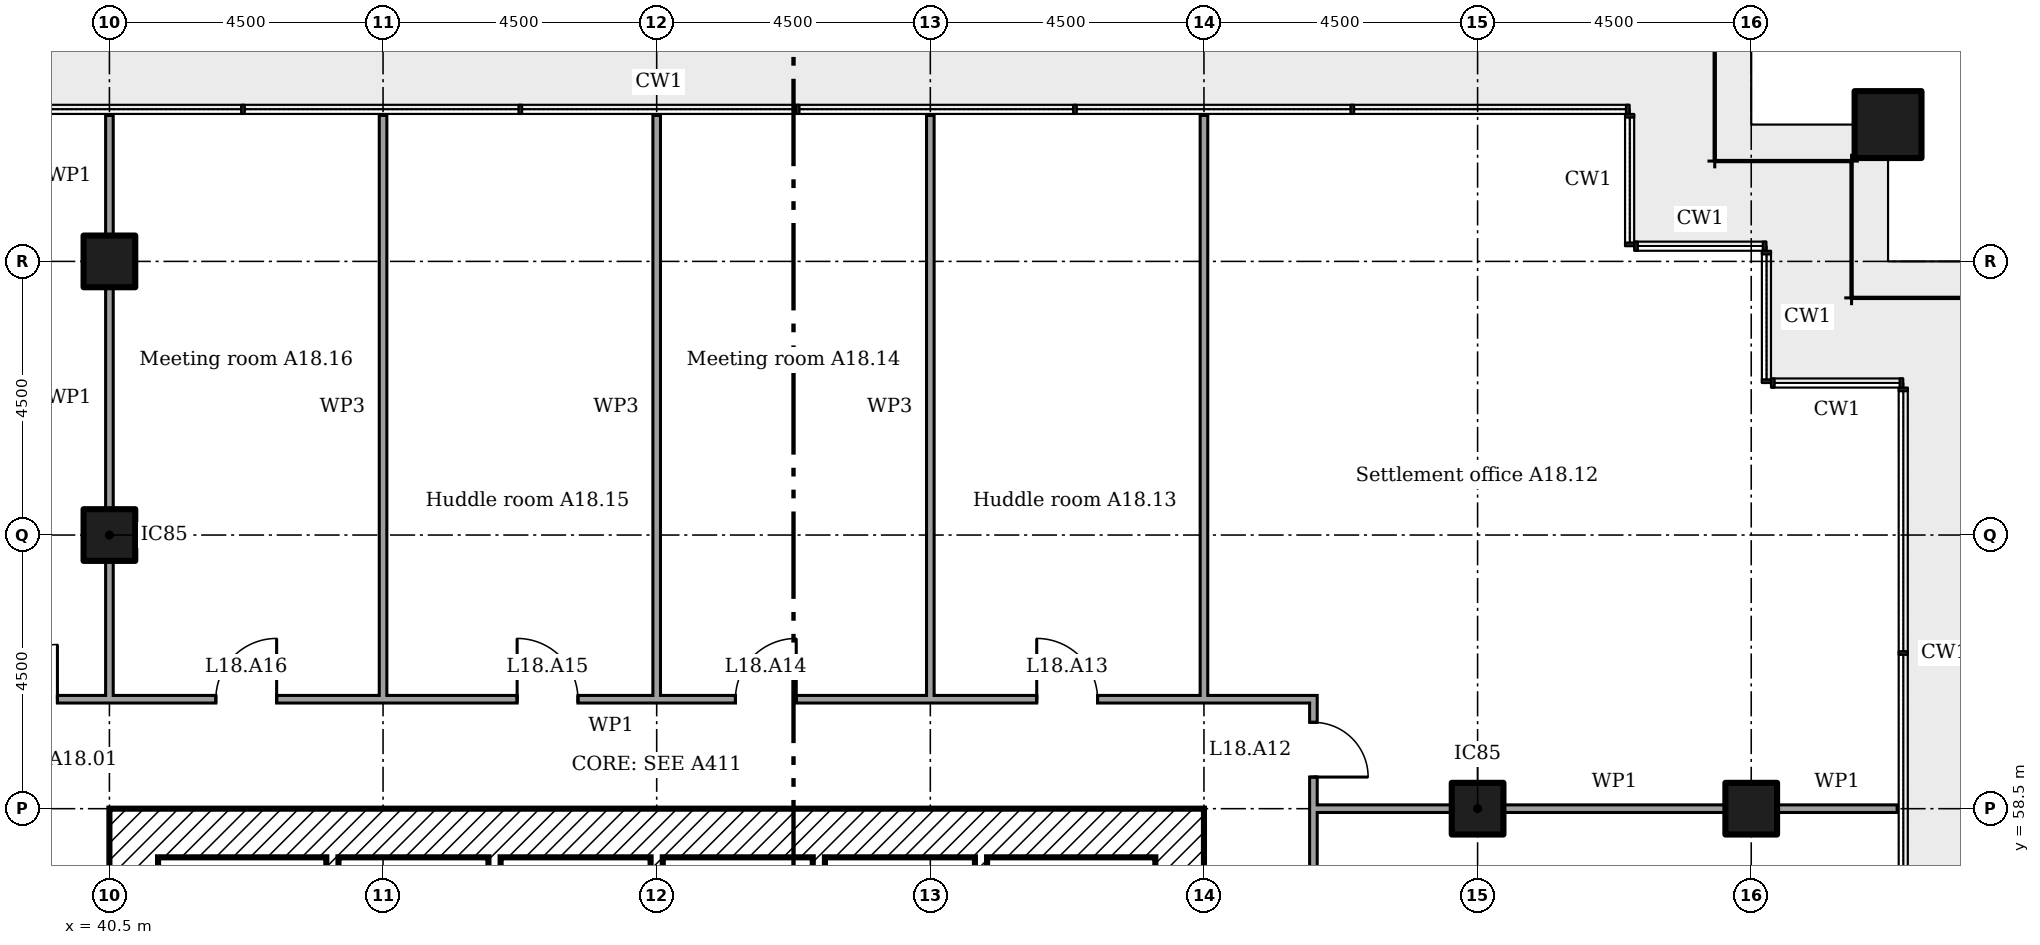
"""IFC4 building model, lengths in metres.
Left out: names, types, materials, properties, quantities, classifications, styles, units other than length and angle.
Written with IfcOpenShell. Run it as: python <this file> out.ifc"""

import sys

from ifc_helpers import new_model, si_unit, direction, frame, frame_2d, origin, origin_2d, place, context, subcontext, project, spatial, rectangle, extrude, element, fill, save


model = new_model("IFC4")
c1 = context("Model", 3, precision=1e-05, world=origin(), true_north=direction((0.0, 1.0)))
c2 = subcontext(c1, "Body", "Model", "MODEL_VIEW")
j1 = project(units=[si_unit("LENGTHUNIT", "METRE"), si_unit("PLANEANGLEUNIT", "RADIAN")], contexts=[c1])
p1 = place(None, origin())
s1 = spatial("IfcSite", under=j1, at=p1, CompositionType="ELEMENT")
p2 = place(p1, origin())
s2 = spatial("IfcBuilding", under=s1, at=p2, CompositionType="ELEMENT")
p3 = place(p2, frame((0.0, 0.0, 76.2)))
s3 = spatial("IfcBuildingStorey", under=s2, at=p3, CompositionType="ELEMENT", Elevation=76.2)
p4 = place(p3, frame((69.75, 69.75, 0.0)))
e1 = element("IfcColumn", 1, at=p4, inside=s3, PredefinedType="COLUMN", context=c2, shape_type="SweptSolid", body=[
    extrude(rectangle(XDim=1.1, YDim=1.1, at=origin_2d()), origin(), (0.0, 0.0, 1.0), 3.6),
])
for number, where in (
    (2, (40.5, 63.0, 0.0)),
    (3, (40.5, 67.5, 0.0)),
    (4, (63.0, 58.5, 0.0)),
    (5, (67.5, 58.5, 0.0)),
):
    element("IfcColumn", number, at=place(p3, frame(where)), inside=s3, PredefinedType="COLUMN", context=c2, shape_type="SweptSolid", body=[
        extrude(rectangle(XDim=0.85, YDim=0.85, at=origin_2d()), origin(), (0.0, 0.0, 1.0), 3.6),
    ])
p5 = place(p3, frame((58.1, 40.5, 0.0), z_axis=(0.0, 0.0, 1.0), x_axis=(0.0, 1.0, 0.0)))
e6 = element("IfcWall", 6, at=p5, inside=s3, PredefinedType="SHEAR", context=c2, shape_type="SweptSolid", body=[
    extrude(rectangle(XDim=18.0, YDim=0.8, at=frame_2d((9.0, 0.0))), origin(), (0.0, 0.0, 1.0), 3.35),
])
p6 = place(p5, frame((13.15, 0.0, 0.0)))
e7 = element("IfcOpeningElement", 7, at=p6, cuts=e6, PredefinedType="OPENING", context=c2, shape_type="SweptSolid", body=[
    extrude(rectangle(XDim=1.2, YDim=2.1, at=frame_2d((0.6, 1.05))), frame((0.0, 0.41, 0.0), z_axis=(0.0, -1.0, 0.0), x_axis=(1.0, 0.0, 0.0)), (0.0, 0.0, 1.0), 0.82),
])
p7 = place(p5, frame((3.9, 0.0, 0.0)))
e8 = element("IfcOpeningElement", 8, at=p7, cuts=e6, PredefinedType="OPENING", context=c2, shape_type="SweptSolid", body=[
    extrude(rectangle(XDim=1.8, YDim=2.1, at=frame_2d((0.9, 1.05))), frame((0.0, 0.41, 0.0), z_axis=(0.0, -1.0, 0.0), x_axis=(1.0, 0.0, 0.0)), (0.0, 0.0, 1.0), 0.82),
])
p8 = place(p5, frame((11.525, 0.0, 0.0)))
e9 = element("IfcOpeningElement", 9, at=p8, cuts=e6, PredefinedType="OPENING", context=c2, shape_type="SweptSolid", body=[
    extrude(rectangle(XDim=1.0, YDim=2.1, at=frame_2d((0.5, 1.05))), frame((0.0, 0.41, 0.0), z_axis=(0.0, -1.0, 0.0), x_axis=(1.0, 0.0, 0.0)), (0.0, 0.0, 1.0), 0.82),
])
p9 = place(p3, frame((41.3, 58.1, 0.0)))
e10 = element("IfcWall", 10, at=p9, inside=s3, PredefinedType="SHEAR", context=c2, shape_type="SweptSolid", body=[
    extrude(rectangle(XDim=16.4, YDim=0.8, at=frame_2d((8.2, 0.0))), origin(), (0.0, 0.0, 1.0), 3.35),
])
p10 = place(p3, frame((40.9, 40.5, 0.0), z_axis=(0.0, 0.0, 1.0), x_axis=(0.0, 1.0, 0.0)))
e11 = element("IfcWall", 11, at=p10, inside=s3, PredefinedType="SHEAR", context=c2, shape_type="SweptSolid", body=[
    extrude(rectangle(XDim=18.0, YDim=0.8, at=frame_2d((9.0, 0.0))), origin(), (0.0, 0.0, 1.0), 3.35),
])
p11 = place(p10, frame((3.65, 0.0, 0.0)))
e12 = element("IfcOpeningElement", 12, at=p11, cuts=e11, PredefinedType="OPENING", context=c2, shape_type="SweptSolid", body=[
    extrude(rectangle(XDim=1.2, YDim=2.1, at=frame_2d((0.6, 1.05))), frame((0.0, 0.41, 0.0), z_axis=(0.0, -1.0, 0.0), x_axis=(1.0, 0.0, 0.0)), (0.0, 0.0, 1.0), 0.82),
])
p12 = place(p10, frame((5.475, 0.0, 0.0)))
e13 = element("IfcOpeningElement", 13, at=p12, cuts=e11, PredefinedType="OPENING", context=c2, shape_type="SweptSolid", body=[
    extrude(rectangle(XDim=1.0, YDim=2.1, at=frame_2d((0.5, 1.05))), frame((0.0, 0.41, 0.0), z_axis=(0.0, -1.0, 0.0), x_axis=(1.0, 0.0, 0.0)), (0.0, 0.0, 1.0), 0.82),
])
p13 = place(p10, frame((12.3, 0.0, 0.0)))
e14 = element("IfcOpeningElement", 14, at=p13, cuts=e11, PredefinedType="OPENING", context=c2, shape_type="SweptSolid", body=[
    extrude(rectangle(XDim=1.0, YDim=2.1, at=frame_2d((0.5, 1.05))), frame((0.0, 0.41, 0.0), z_axis=(0.0, -1.0, 0.0), x_axis=(1.0, 0.0, 0.0)), (0.0, 0.0, 1.0), 0.82),
])
p14 = place(p3, frame((44.167, 57.7, 0.0), z_axis=(0.0, 0.0, 1.0), x_axis=(0.0, -1.0, 0.0)))
e15 = element("IfcWall", 15, at=p14, inside=s3, PredefinedType="SHEAR", context=c2, shape_type="SweptSolid", body=[
    extrude(rectangle(XDim=3.3, YDim=0.2, at=frame_2d((1.65, 0.0))), origin(), (0.0, 0.0, 1.0), 3.35),
])
p15 = place(p3, frame((46.833, 57.7, 0.0), z_axis=(0.0, 0.0, 1.0), x_axis=(0.0, -1.0, 0.0)))
e16 = element("IfcWall", 16, at=p15, inside=s3, PredefinedType="SHEAR", context=c2, shape_type="SweptSolid", body=[
    extrude(rectangle(XDim=4.4, YDim=0.2, at=frame_2d((2.2, 0.0))), origin(), (0.0, 0.0, 1.0), 3.35),
])
for number, where, z_axis, x_axis in (
    (17, (49.5, 57.7, 0.0), (0.0, 0.0, 1.0), (0.0, -1.0, 0.0)),
    (18, (52.167, 57.7, 0.0), (0.0, 0.0, 1.0), (0.0, -1.0, 0.0)),
    (19, (54.833, 57.7, 0.0), (0.0, 0.0, 1.0), (0.0, -1.0, 0.0)),
):
    element("IfcWall", number, at=place(p3, frame(where, z_axis=z_axis, x_axis=x_axis)), inside=s3, PredefinedType="SHEAR", context=c2, shape_type="SweptSolid", body=[
        extrude(rectangle(XDim=2.5, YDim=0.2, at=frame_2d((1.25, 0.0))), origin(), (0.0, 0.0, 1.0), 3.35),
    ])
p16 = place(p3, frame((60.3, 58.5, 0.0)))
e20 = element("IfcWall", 20, at=p16, inside=s3, PredefinedType="PARTITIONING", context=c2, shape_type="SweptSolid", body=[
    extrude(rectangle(XDim=2.275, YDim=0.125, at=frame_2d((1.137, 0.0))), origin(), (0.0, 0.0, 1.0), 2.676),
])
p17 = place(p3, frame((63.425, 58.5, 0.0)))
e21 = element("IfcWall", 21, at=p17, inside=s3, PredefinedType="PARTITIONING", context=c2, shape_type="SweptSolid", body=[
    extrude(rectangle(XDim=3.65, YDim=0.125, at=frame_2d((1.825, 0.0))), origin(), (0.0, 0.0, 1.0), 2.676),
])
p18 = place(p3, frame((67.925, 58.5, 0.0)))
e22 = element("IfcWall", 22, at=p18, inside=s3, PredefinedType="PARTITIONING", context=c2, shape_type="SweptSolid", body=[
    extrude(rectangle(XDim=1.975, YDim=0.125, at=frame_2d((0.987, 0.0))), origin(), (0.0, 0.0, 1.0), 2.676),
])
p19 = place(p3, frame((37.137, 60.3, 0.0)))
e23 = element("IfcWall", 23, at=p19, inside=s3, PredefinedType="PARTITIONING", context=c2, shape_type="SweptSolid", body=[
    extrude(rectangle(XDim=23.225, YDim=0.125, at=frame_2d((11.613, 0.0))), origin(), (0.0, 0.0, 1.0), 3.45),
])
p20 = place(p19, frame((18.613, 0.0, 0.0)))
e24 = element("IfcOpeningElement", 24, at=p20, cuts=e23, PredefinedType="OPENING", context=c2, shape_type="SweptSolid", body=[
    extrude(rectangle(XDim=1.0, YDim=2.1, at=frame_2d((0.5, 1.05))), frame((0.0, 0.073, 0.0), z_axis=(0.0, -1.0, 0.0), x_axis=(1.0, 0.0, 0.0)), (0.0, 0.0, 1.0), 0.145),
])
p21 = place(p19, frame((13.657, 0.0, 0.0)))
e25 = element("IfcOpeningElement", 25, at=p21, cuts=e23, PredefinedType="OPENING", context=c2, shape_type="SweptSolid", body=[
    extrude(rectangle(XDim=1.0, YDim=2.1, at=frame_2d((0.5, 1.05))), frame((0.0, 0.073, 0.0), z_axis=(0.0, -1.0, 0.0), x_axis=(1.0, 0.0, 0.0)), (0.0, 0.0, 1.0), 0.145),
])
p22 = place(p19, frame((10.067, 0.0, 0.0)))
e26 = element("IfcOpeningElement", 26, at=p22, cuts=e23, PredefinedType="OPENING", context=c2, shape_type="SweptSolid", body=[
    extrude(rectangle(XDim=1.0, YDim=2.1, at=frame_2d((0.5, 1.05))), frame((0.0, 0.073, 0.0), z_axis=(0.0, -1.0, 0.0), x_axis=(1.0, 0.0, 0.0)), (0.0, 0.0, 1.0), 0.145),
])
p23 = place(p19, frame((5.113, 0.0, 0.0)))
e27 = element("IfcOpeningElement", 27, at=p23, cuts=e23, PredefinedType="OPENING", context=c2, shape_type="SweptSolid", body=[
    extrude(rectangle(XDim=1.0, YDim=2.1, at=frame_2d((0.5, 1.05))), frame((0.0, 0.073, 0.0), z_axis=(0.0, -1.0, 0.0), x_axis=(1.0, 0.0, 0.0)), (0.0, 0.0, 1.0), 0.145),
])
p24 = place(p19, frame((0.708, 0.0, 0.0)))
e28 = element("IfcOpeningElement", 28, at=p24, cuts=e23, PredefinedType="OPENING", context=c2, shape_type="SweptSolid", body=[
    extrude(rectangle(XDim=1.8, YDim=2.1, at=frame_2d((0.9, 1.05))), frame((0.0, 0.073, 0.0), z_axis=(0.0, -1.0, 0.0), x_axis=(1.0, 0.0, 0.0)), (0.0, 0.0, 1.0), 0.145),
])
p25 = place(p3, frame((40.5, 60.3, 0.0), z_axis=(0.0, 0.0, 1.0), x_axis=(0.0, 1.0, 0.0)))
e29 = element("IfcWall", 29, at=p25, inside=s3, PredefinedType="PARTITIONING", context=c2, shape_type="SweptSolid", body=[
    extrude(rectangle(XDim=2.275, YDim=0.125, at=frame_2d((1.137, 0.0))), origin(), (0.0, 0.0, 1.0), 2.676),
])
p26 = place(p3, frame((40.5, 63.425, 0.0), z_axis=(0.0, 0.0, 1.0), x_axis=(0.0, 1.0, 0.0)))
e30 = element("IfcWall", 30, at=p26, inside=s3, PredefinedType="PARTITIONING", context=c2, shape_type="SweptSolid", body=[
    extrude(rectangle(XDim=3.65, YDim=0.125, at=frame_2d((1.825, 0.0))), origin(), (0.0, 0.0, 1.0), 2.676),
])
p27 = place(p3, frame((40.5, 67.925, 0.0), z_axis=(0.0, 0.0, 1.0), x_axis=(0.0, 1.0, 0.0)))
e31 = element("IfcWall", 31, at=p27, inside=s3, PredefinedType="PARTITIONING", context=c2, shape_type="SweptSolid", body=[
    extrude(rectangle(XDim=1.975, YDim=0.125, at=frame_2d((0.987, 0.0))), origin(), (0.0, 0.0, 1.0), 2.676),
])
for number, where, z_axis, x_axis in (
    (32, (45.0, 60.3, 0.0), (0.0, 0.0, 1.0), (0.0, 1.0, 0.0)),
    (33, (49.5, 60.3, 0.0), (0.0, 0.0, 1.0), (0.0, 1.0, 0.0)),
    (34, (54.0, 60.3, 0.0), (0.0, 0.0, 1.0), (0.0, 1.0, 0.0)),
):
    element("IfcWall", number, at=place(p3, frame(where, z_axis=z_axis, x_axis=x_axis)), inside=s3, PredefinedType="MOVABLE", context=c2, shape_type="SweptSolid", body=[
        extrude(rectangle(XDim=9.6, YDim=0.125, at=frame_2d((4.8, 0.0))), origin(), (0.0, 0.0, 1.0), 2.766),
    ])
p28 = place(p3, frame((58.5, 60.3, 0.0), z_axis=(0.0, 0.0, 1.0), x_axis=(0.0, 1.0, 0.0)))
e35 = element("IfcWall", 35, at=p28, inside=s3, PredefinedType="PARTITIONING", context=c2, shape_type="SweptSolid", body=[
    extrude(rectangle(XDim=9.6, YDim=0.125, at=frame_2d((4.8, 0.0))), origin(), (0.0, 0.0, 1.0), 2.766),
])
p29 = place(p3, frame((60.3, 38.762, 0.0), z_axis=(0.0, 0.0, 1.0), x_axis=(0.0, 1.0, 0.0)))
e36 = element("IfcWall", 36, at=p29, inside=s3, PredefinedType="PARTITIONING", context=c2, shape_type="SweptSolid", body=[
    extrude(rectangle(XDim=21.475, YDim=0.125, at=frame_2d((10.738, 0.0))), origin(), (0.0, 0.0, 1.0), 3.45),
])
p30 = place(p29, frame((3.032, 0.0, 0.0)))
e37 = element("IfcOpeningElement", 37, at=p30, cuts=e36, PredefinedType="OPENING", context=c2, shape_type="SweptSolid", body=[
    extrude(rectangle(XDim=1.0, YDim=2.1, at=frame_2d((0.5, 1.05))), frame((0.0, 0.073, 0.0), z_axis=(0.0, -1.0, 0.0), x_axis=(1.0, 0.0, 0.0)), (0.0, 0.0, 1.0), 0.145),
])
p31 = place(p29, frame((8.442, 0.0, 0.0)))
e38 = element("IfcOpeningElement", 38, at=p31, cuts=e36, PredefinedType="OPENING", context=c2, shape_type="SweptSolid", body=[
    extrude(rectangle(XDim=1.0, YDim=2.1, at=frame_2d((0.5, 1.05))), frame((0.0, 0.073, 0.0), z_axis=(0.0, -1.0, 0.0), x_axis=(1.0, 0.0, 0.0)), (0.0, 0.0, 1.0), 0.145),
])
p32 = place(p29, frame((12.488, 0.0, 0.0)))
e39 = element("IfcOpeningElement", 39, at=p32, cuts=e36, PredefinedType="OPENING", context=c2, shape_type="SweptSolid", body=[
    extrude(rectangle(XDim=1.0, YDim=2.1, at=frame_2d((0.5, 1.05))), frame((0.0, 0.073, 0.0), z_axis=(0.0, -1.0, 0.0), x_axis=(1.0, 0.0, 0.0)), (0.0, 0.0, 1.0), 0.145),
])
p33 = place(p29, frame((16.532, 0.0, 0.0)))
e40 = element("IfcOpeningElement", 40, at=p33, cuts=e36, PredefinedType="OPENING", context=c2, shape_type="SweptSolid", body=[
    extrude(rectangle(XDim=1.0, YDim=2.1, at=frame_2d((0.5, 1.05))), frame((0.0, 0.073, 0.0), z_axis=(0.0, -1.0, 0.0), x_axis=(1.0, 0.0, 0.0)), (0.0, 0.0, 1.0), 0.145),
])
p34 = place(p29, frame((20.258, 0.0, 0.0)))
e41 = element("IfcOpeningElement", 41, at=p34, cuts=e36, PredefinedType="OPENING", context=c2, shape_type="SweptSolid", body=[
    extrude(rectangle(XDim=0.9, YDim=2.1, at=frame_2d((0.45, 1.05))), frame((0.0, 0.073, 0.0), z_axis=(0.0, -1.0, 0.0), x_axis=(1.0, 0.0, 0.0)), (0.0, 0.0, 1.0), 0.145),
])
p35 = place(p34, frame((0.9, 0.0, 0.0), x_axis=(-1.0, 0.0, 0.0)))
e42 = element("IfcDoor", 42, at=p35, inside=s3, OperationType="SINGLE_SWING_LEFT", PredefinedType="DOOR", context=c2, shape_type="SweptSolid", body=[
    extrude(rectangle(XDim=0.9, YDim=2.1, at=frame_2d((0.45, 1.05))), frame((0.0, 0.025, 0.0), z_axis=(0.0, -1.0, 0.0), x_axis=(1.0, 0.0, 0.0)), (0.0, 0.0, 1.0), 0.05),
])
fill(e41, e42)
p36 = place(p20, origin())
e43 = element("IfcDoor", 43, at=p36, inside=s3, OperationType="SINGLE_SWING_RIGHT", PredefinedType="DOOR", context=c2, shape_type="SweptSolid", body=[
    extrude(rectangle(XDim=1.0, YDim=2.1, at=frame_2d((0.5, 1.05))), frame((0.0, 0.025, 0.0), z_axis=(0.0, -1.0, 0.0), x_axis=(1.0, 0.0, 0.0)), (0.0, 0.0, 1.0), 0.05),
])
fill(e24, e43)
p37 = place(p21, origin())
e44 = element("IfcDoor", 44, at=p37, inside=s3, OperationType="SINGLE_SWING_LEFT", PredefinedType="DOOR", context=c2, shape_type="SweptSolid", body=[
    extrude(rectangle(XDim=1.0, YDim=2.1, at=frame_2d((0.5, 1.05))), frame((0.0, 0.025, 0.0), z_axis=(0.0, -1.0, 0.0), x_axis=(1.0, 0.0, 0.0)), (0.0, 0.0, 1.0), 0.05),
])
fill(e25, e44)
p38 = place(p22, origin())
e45 = element("IfcDoor", 45, at=p38, inside=s3, OperationType="SINGLE_SWING_RIGHT", PredefinedType="DOOR", context=c2, shape_type="SweptSolid", body=[
    extrude(rectangle(XDim=1.0, YDim=2.1, at=frame_2d((0.5, 1.05))), frame((0.0, 0.025, 0.0), z_axis=(0.0, -1.0, 0.0), x_axis=(1.0, 0.0, 0.0)), (0.0, 0.0, 1.0), 0.05),
])
fill(e26, e45)
p39 = place(p23, origin())
e46 = element("IfcDoor", 46, at=p39, inside=s3, OperationType="SINGLE_SWING_LEFT", PredefinedType="DOOR", context=c2, shape_type="SweptSolid", body=[
    extrude(rectangle(XDim=1.0, YDim=2.1, at=frame_2d((0.5, 1.05))), frame((0.0, 0.025, 0.0), z_axis=(0.0, -1.0, 0.0), x_axis=(1.0, 0.0, 0.0)), (0.0, 0.0, 1.0), 0.05),
])
fill(e27, e46)
p40 = place(p24, origin())
e47 = element("IfcDoor", 47, at=p40, inside=s3, OperationType="DOUBLE_DOOR_SINGLE_SWING", PredefinedType="DOOR", context=c2, shape_type="SweptSolid", body=[
    extrude(rectangle(XDim=1.8, YDim=2.1, at=frame_2d((0.9, 1.05))), frame((0.0, 0.025, 0.0), z_axis=(0.0, -1.0, 0.0), x_axis=(1.0, 0.0, 0.0)), (0.0, 0.0, 1.0), 0.05),
])
fill(e28, e47)
save(model, sys.argv[1])
